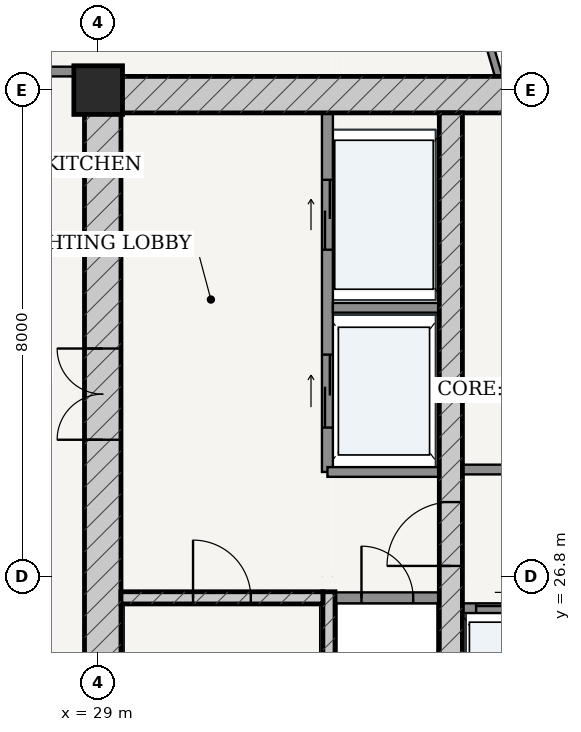
"""IFC4 building model, lengths in metres.
Left out: names, types, materials, properties, quantities, classifications, styles, units other than length and angle.
Written with IfcOpenShell. Run it as: python <this file> out.ifc"""

import sys

from ifc_helpers import new_model, si_unit, direction, frame, frame_2d, origin, origin_2d, place, context, subcontext, project, spatial, rectangle, extrude, source, transform, mapped, element, fill, save


model = new_model("IFC4")
c1 = context("Model", 3, precision=1e-05, world=origin(), true_north=direction((-0.2419218956, 0.970295726276)))
c2 = subcontext(c1, "Body", "Model", "MODEL_VIEW")
j1 = project(units=[si_unit("LENGTHUNIT", "METRE"), si_unit("PLANEANGLEUNIT", "RADIAN")], contexts=[c1])
p1 = place(None, origin())
s1 = spatial("IfcSite", under=j1, at=p1, CompositionType="ELEMENT")
p2 = place(p1, origin())
s2 = spatial("IfcBuilding", under=s1, at=p2, CompositionType="ELEMENT")
p3 = place(p2, frame((0.0, 0.0, 224.5)))
s3 = spatial("IfcBuildingStorey", under=s2, at=p3, CompositionType="ELEMENT", Elevation=224.5)
p4 = place(p3, frame((29.0, 34.8, 0.0), z_axis=(0.0, 0.0, 1.0), x_axis=(1.0, 0.0, 0.0)))
e1 = element("IfcColumn", 1, at=p4, inside=s3, PredefinedType="COLUMN", context=c2, shape_type="SweptSolid", body=[
    extrude(rectangle(XDim=0.8, YDim=0.8, at=origin_2d()), origin(), (0.0, 0.0, 1.0), 3.7),
])
p5 = place(p3, frame((28.775, 34.725, 0.0), z_axis=(0.0, 0.0, 1.0), x_axis=(1.0, 0.0, 0.0)))
e2 = element("IfcWall", 2, at=p5, inside=s3, PredefinedType="SHEAR", context=c2, shape_type="SweptSolid", body=[
    extrude(rectangle(XDim=18.45, YDim=0.6, at=frame_2d((9.225, 0.0))), origin(), (0.0, 0.0, 1.0), 3.435),
])
p6 = place(p3, frame((29.075, 19.175, 0.0), z_axis=(0.0, 0.0, 1.0), x_axis=(0.0, 1.0, 0.0)))
e3 = element("IfcWall", 3, at=p6, inside=s3, PredefinedType="SHEAR", context=c2, shape_type="SweptSolid", body=[
    extrude(rectangle(XDim=15.25, YDim=0.6, at=frame_2d((7.625, 0.0))), origin(), (0.0, 0.0, 1.0), 3.435),
])
p7 = place(p6, frame((9.875, 0.0, 0.0)))
e4 = element("IfcOpeningElement", 4, at=p7, cuts=e3, PredefinedType="OPENING", context=c2, shape_type="SweptSolid", body=[
    extrude(rectangle(XDim=1.5, YDim=2.2, at=frame_2d((0.75, 1.1))), frame((0.0, 0.31, 0.0), z_axis=(0.0, -1.0, 0.0), x_axis=(1.0, 0.0, 0.0)), (0.0, 0.0, 1.0), 0.62),
])
p8 = place(p3, frame((32.795, 19.175, 0.0), z_axis=(0.0, 0.0, 1.0), x_axis=(0.0, 1.0, 0.0)))
e5 = element("IfcWall", 5, at=p8, inside=s3, PredefinedType="SOLIDWALL", context=c2, shape_type="SweptSolid", body=[
    extrude(rectangle(XDim=7.375, YDim=0.2, at=frame_2d((3.688, 0.0))), origin(), (0.0, 0.0, 1.0), 3.435),
])
p9 = place(p3, frame((29.375, 26.45, 0.0), z_axis=(0.0, 0.0, 1.0), x_axis=(1.0, 0.0, 0.0)))
e6 = element("IfcWall", 6, at=p9, inside=s3, PredefinedType="SOLIDWALL", context=c2, shape_type="SweptSolid", body=[
    extrude(rectangle(XDim=3.32, YDim=0.2, at=frame_2d((1.66, 0.0))), origin(), (0.0, 0.0, 1.0), 3.435),
])
p10 = place(p9, frame((1.185, 0.0, 0.0)))
e7 = element("IfcOpeningElement", 7, at=p10, cuts=e6, PredefinedType="OPENING", context=c2, shape_type="SweptSolid", body=[
    extrude(rectangle(XDim=0.95, YDim=2.15, at=frame_2d((0.475, 1.075))), frame((0.0, 0.11, 0.0), z_axis=(0.0, -1.0, 0.0), x_axis=(1.0, 0.0, 0.0)), (0.0, 0.0, 1.0), 0.22),
])
p11 = place(p3, frame((34.8, 19.175, 0.0), z_axis=(0.0, 0.0, 1.0), x_axis=(0.0, 1.0, 0.0)))
e8 = element("IfcWall", 8, at=p11, inside=s3, PredefinedType="SHEAR", context=c2, shape_type="SweptSolid", body=[
    extrude(rectangle(XDim=15.25, YDim=0.38, at=frame_2d((7.625, 0.0))), origin(), (0.0, 0.0, 1.0), 3.435),
])
p12 = place(p11, frame((7.8, 0.0, 0.0)))
e9 = element("IfcOpeningElement", 9, at=p12, cuts=e8, PredefinedType="OPENING", context=c2, shape_type="SweptSolid", body=[
    extrude(rectangle(XDim=1.05, YDim=2.15, at=frame_2d((0.525, 1.075))), frame((0.0, 0.2, 0.0), z_axis=(0.0, -1.0, 0.0), x_axis=(1.0, 0.0, 0.0)), (0.0, 0.0, 1.0), 0.4),
])
p13 = place(p3, frame((32.9, 26.45, 0.0), z_axis=(0.0, 0.0, 1.0), x_axis=(1.0, 0.0, 0.0)))
e10 = element("IfcWall", 10, at=p13, inside=s3, PredefinedType="PARTITIONING", context=c2, shape_type="SweptSolid", body=[
    extrude(rectangle(XDim=1.71, YDim=0.18, at=frame_2d((0.855, 0.0))), origin(), (0.0, 0.0, 1.0), 3.435),
])
p14 = place(p13, frame((0.43, 0.0, 0.0)))
e11 = element("IfcOpeningElement", 11, at=p14, cuts=e10, PredefinedType="OPENING", context=c2, shape_type="SweptSolid", body=[
    extrude(rectangle(XDim=0.85, YDim=2.1, at=frame_2d((0.425, 1.05))), frame((0.0, 0.1, 0.0), z_axis=(0.0, -1.0, 0.0), x_axis=(1.0, 0.0, 0.0)), (0.0, 0.0, 1.0), 0.2),
])
p15 = place(p3, frame((32.77, 28.52, 0.0), z_axis=(0.0, 0.0, 1.0), x_axis=(0.0, 1.0, 0.0)))
e12 = element("IfcWall", 12, at=p15, inside=s3, PredefinedType="PARTITIONING", context=c2, shape_type="SweptSolid", body=[
    extrude(rectangle(XDim=5.905, YDim=0.18, at=frame_2d((2.953, 0.0))), origin(), (0.0, 0.0, 1.0), 3.435),
])
p16 = place(p15, frame((3.655, 0.0, 0.0)))
e13 = element("IfcOpeningElement", 13, at=p16, cuts=e12, PredefinedType="OPENING", context=c2, shape_type="SweptSolid", body=[
    extrude(rectangle(XDim=1.15, YDim=2.2, at=frame_2d((0.575, 1.1))), frame((0.0, 0.1, 0.0), z_axis=(0.0, -1.0, 0.0), x_axis=(1.0, 0.0, 0.0)), (0.0, 0.0, 1.0), 0.2),
])
p17 = place(p15, frame((0.73, 0.0, 0.0)))
e14 = element("IfcOpeningElement", 14, at=p17, cuts=e12, PredefinedType="OPENING", context=c2, shape_type="SweptSolid", body=[
    extrude(rectangle(XDim=1.2, YDim=2.25, at=frame_2d((0.6, 1.125))), frame((0.0, 0.1, 0.0), z_axis=(0.0, -1.0, 0.0), x_axis=(1.0, 0.0, 0.0)), (0.0, 0.0, 1.0), 0.2),
])
p18 = place(p3, frame((32.86, 31.22, 0.0), z_axis=(0.0, 0.0, 1.0), x_axis=(1.0, 0.0, 0.0)))
e15 = element("IfcWall", 15, at=p18, inside=s3, PredefinedType="PARTITIONING", context=c2, shape_type="SweptSolid", body=[
    extrude(rectangle(XDim=1.75, YDim=0.16, at=frame_2d((0.875, 0.0))), origin(), (0.0, 0.0, 1.0), 3.435),
])
p19 = place(p3, frame((32.77, 28.52, 0.0), z_axis=(0.0, 0.0, 1.0), x_axis=(1.0, 0.0, 0.0)))
e16 = element("IfcWall", 16, at=p19, inside=s3, PredefinedType="PARTITIONING", context=c2, shape_type="SweptSolid", body=[
    extrude(rectangle(XDim=1.84, YDim=0.16, at=frame_2d((0.92, 0.0))), origin(), (0.0, 0.0, 1.0), 3.435),
])
p20 = place(p3, frame((34.99, 28.56, 0.0), z_axis=(0.0, 0.0, 1.0), x_axis=(1.0, 0.0, 0.0)))
e17 = element("IfcWall", 17, at=p20, inside=s3, PredefinedType="PARTITIONING", context=c2, shape_type="SweptSolid", body=[
    extrude(rectangle(XDim=6.02, YDim=0.16, at=frame_2d((3.01, 0.0))), origin(), (0.0, 0.0, 1.0), 3.435),
])
p21 = place(p20, frame((2.585, 0.0, 0.0)))
e18 = element("IfcOpeningElement", 18, at=p21, cuts=e17, PredefinedType="OPENING", context=c2, shape_type="SweptSolid", body=[
    extrude(rectangle(XDim=0.85, YDim=2.1, at=frame_2d((0.425, 1.05))), frame((0.0, 0.09, 0.0), z_axis=(0.0, -1.0, 0.0), x_axis=(1.0, 0.0, 0.0)), (0.0, 0.0, 1.0), 0.18),
])
p22 = place(p3, frame((34.99, 26.28, 0.0), z_axis=(0.0, 0.0, 1.0), x_axis=(1.0, 0.0, 0.0)))
e19 = element("IfcWall", 19, at=p22, inside=s3, PredefinedType="PARTITIONING", context=c2, shape_type="SweptSolid", body=[
    extrude(rectangle(XDim=6.02, YDim=0.16, at=frame_2d((3.01, 0.0))), origin(), (0.0, 0.0, 1.0), 3.435),
])
p23 = place(p22, frame((0.225, 0.0, 0.0)))
e20 = element("IfcOpeningElement", 20, at=p23, cuts=e19, PredefinedType="OPENING", context=c2, shape_type="SweptSolid", body=[
    extrude(rectangle(XDim=1.1, YDim=2.2, at=frame_2d((0.55, 1.1))), frame((0.0, 0.09, 0.0), z_axis=(0.0, -1.0, 0.0), x_axis=(1.0, 0.0, 0.0)), (0.0, 0.0, 1.0), 0.18),
])
p24 = place(p22, frame((1.705, 0.0, 0.0)))
e21 = element("IfcOpeningElement", 21, at=p24, cuts=e19, PredefinedType="OPENING", context=c2, shape_type="SweptSolid", body=[
    extrude(rectangle(XDim=1.1, YDim=2.2, at=frame_2d((0.55, 1.1))), frame((0.0, 0.09, 0.0), z_axis=(0.0, -1.0, 0.0), x_axis=(1.0, 0.0, 0.0)), (0.0, 0.0, 1.0), 0.18),
])
p25 = place(p3, frame((26.845, 35.105, 0.0), z_axis=(0.0, 0.0, 1.0), x_axis=(1.0, 0.0, 0.0)))
e22 = element("IfcWall", 22, at=p25, inside=s3, PredefinedType="PARTITIONING", context=c2, shape_type="SweptSolid", body=[
    extrude(rectangle(XDim=1.93, YDim=0.16, at=frame_2d((0.965, 0.0))), origin(), (0.0, 0.0, 1.0), 3.435),
])
p26 = place(p25, frame((0.37, 0.0, 0.0)))
e23 = element("IfcOpeningElement", 23, at=p26, cuts=e22, PredefinedType="OPENING", context=c2, shape_type="SweptSolid", body=[
    extrude(rectangle(XDim=0.98, YDim=2.2, at=frame_2d((0.49, 1.1))), frame((0.0, 0.09, 0.0), z_axis=(0.0, -1.0, 0.0), x_axis=(1.0, 0.0, 0.0)), (0.0, 0.0, 1.0), 0.18),
])
p27 = place(p3, frame((35.586, 35.027, 0.0), z_axis=(0.0, 0.0, 1.0), x_axis=(-0.281539118681, 0.959549751004, 0.0)))
e24 = element("IfcWall", 24, at=p27, inside=s3, PredefinedType="PARTITIONING", context=c2, shape_type="SweptSolid", body=[
    extrude(rectangle(XDim=2.698, YDim=0.12, at=frame_2d((1.349, 0.0))), origin(), (0.0, 0.0, 1.0), 2.52),
])
p28 = place(p27, frame((0.919, 0.0, 0.0)))
e25 = element("IfcOpeningElement", 25, at=p28, cuts=e24, PredefinedType="OPENING", context=c2, shape_type="SweptSolid", body=[
    extrude(rectangle(XDim=0.86, YDim=2.15, at=frame_2d((0.43, 1.075))), frame((0.0, 0.07, 0.0), z_axis=(0.0, -1.0, 0.0), x_axis=(1.0, 0.0, 0.0)), (0.0, 0.0, 1.0), 0.14),
])
m1 = source(origin(), c2, "Body", "SweptSolid", [
    extrude(rectangle(XDim=1.5, YDim=2.2, at=frame_2d((0.75, 1.1))), frame((0.0, 0.025, 0.0), z_axis=(0.0, -1.0, 0.0), x_axis=(1.0, 0.0, 0.0)), (0.0, 0.0, 1.0), 0.05),
])
p29 = place(p7, origin())
e26 = element("IfcDoor", 26, at=p29, inside=s3, OperationType="DOUBLE_DOOR_SINGLE_SWING", PredefinedType="DOOR", context=c2, shape_type="MappedRepresentation", body=[
    mapped(m1, transform((0.0, 0.0, 0.0), scale=1.0)),
])
fill(e4, e26)
m2 = source(origin(), c2, "Body", "SweptSolid", [
    extrude(rectangle(XDim=1.05, YDim=2.15, at=frame_2d((0.525, 1.075))), frame((0.0, 0.025, 0.0), z_axis=(0.0, -1.0, 0.0), x_axis=(1.0, 0.0, 0.0)), (0.0, 0.0, 1.0), 0.05),
])
p30 = place(p12, origin())
e27 = element("IfcDoor", 27, at=p30, inside=s3, OperationType="SINGLE_SWING_LEFT", PredefinedType="DOOR", context=c2, shape_type="MappedRepresentation", body=[
    mapped(m2, transform((0.0, 0.0, 0.0), scale=1.0)),
])
fill(e9, e27)
m3 = source(origin(), c2, "Body", "SweptSolid", [
    extrude(rectangle(XDim=0.95, YDim=2.15, at=frame_2d((0.475, 1.075))), frame((0.0, 0.025, 0.0), z_axis=(0.0, -1.0, 0.0), x_axis=(1.0, 0.0, 0.0)), (0.0, 0.0, 1.0), 0.05),
])
p31 = place(p10, origin())
e28 = element("IfcDoor", 28, at=p31, inside=s3, OperationType="SINGLE_SWING_LEFT", PredefinedType="DOOR", context=c2, shape_type="MappedRepresentation", body=[
    mapped(m3, transform((0.0, 0.0, 0.0), scale=1.0)),
])
fill(e7, e28)
m4 = source(origin(), c2, "Body", "SweptSolid", [
    extrude(rectangle(XDim=0.85, YDim=2.1, at=frame_2d((0.425, 1.05))), frame((0.0, 0.025, 0.0), z_axis=(0.0, -1.0, 0.0), x_axis=(1.0, 0.0, 0.0)), (0.0, 0.0, 1.0), 0.05),
])
p32 = place(p14, origin())
e29 = element("IfcDoor", 29, at=p32, inside=s3, OperationType="SINGLE_SWING_LEFT", PredefinedType="DOOR", context=c2, shape_type="MappedRepresentation", body=[
    mapped(m4, transform((0.0, 0.0, 0.0), scale=1.0)),
])
fill(e11, e29)
m5 = source(origin(), c2, "Body", "SweptSolid", [
    extrude(rectangle(XDim=1.15, YDim=2.2, at=frame_2d((0.575, 1.1))), frame((0.0, 0.025, 0.0), z_axis=(0.0, -1.0, 0.0), x_axis=(1.0, 0.0, 0.0)), (0.0, 0.0, 1.0), 0.05),
])
p33 = place(p16, origin())
e30 = element("IfcDoor", 30, at=p33, inside=s3, OperationType="DOUBLE_DOOR_SLIDING", PredefinedType="DOOR", context=c2, shape_type="MappedRepresentation", body=[
    mapped(m5, transform((0.0, 0.0, 0.0), scale=1.0)),
])
fill(e13, e30)
m6 = source(origin(), c2, "Body", "SweptSolid", [
    extrude(rectangle(XDim=1.2, YDim=2.25, at=frame_2d((0.6, 1.125))), frame((0.0, 0.025, 0.0), z_axis=(0.0, -1.0, 0.0), x_axis=(1.0, 0.0, 0.0)), (0.0, 0.0, 1.0), 0.05),
])
p34 = place(p17, origin())
e31 = element("IfcDoor", 31, at=p34, inside=s3, OperationType="DOUBLE_DOOR_SLIDING", PredefinedType="DOOR", context=c2, shape_type="MappedRepresentation", body=[
    mapped(m6, transform((0.0, 0.0, 0.0), scale=1.0)),
])
fill(e14, e31)
m7 = source(origin(), c2, "Body", "SweptSolid", [
    extrude(rectangle(XDim=1.1, YDim=2.2, at=frame_2d((0.55, 1.1))), frame((0.0, 0.025, 0.0), z_axis=(0.0, -1.0, 0.0), x_axis=(1.0, 0.0, 0.0)), (0.0, 0.0, 1.0), 0.05),
])
p35 = place(p23, origin())
e32 = element("IfcDoor", 32, at=p35, inside=s3, OperationType="DOUBLE_DOOR_SLIDING", PredefinedType="DOOR", context=c2, shape_type="MappedRepresentation", body=[
    mapped(m7, transform((0.0, 0.0, 0.0), scale=1.0)),
])
fill(e20, e32)
save(model, sys.argv[1])
